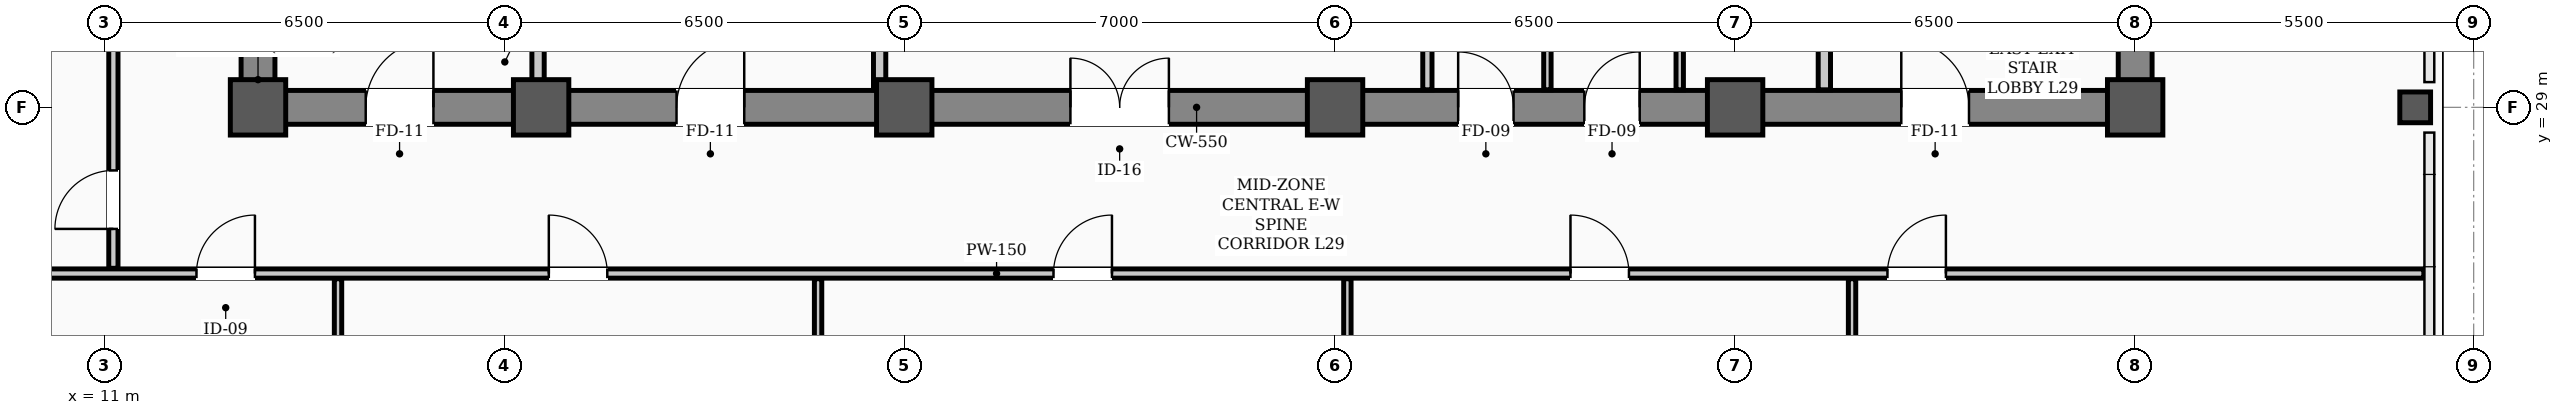
"""IFC4 building model, lengths in metres.
Left out: names, types, materials, properties, quantities, classifications, styles, units other than length and angle.
Written with IfcOpenShell. Run it as: python <this file> out.ifc"""

import sys

from ifc_helpers import new_model, si_unit, direction, frame, frame_2d, origin, origin_2d, place, context, subcontext, project, spatial, rectangle, hollow_rectangle, extrude, element, fill, save


model = new_model("IFC4")
c1 = context("Model", 3, precision=1e-05, world=origin(), true_north=direction((0.0, 1.0)))
c2 = subcontext(c1, "Body", "Model", "MODEL_VIEW")
j1 = project(units=[si_unit("LENGTHUNIT", "METRE"), si_unit("PLANEANGLEUNIT", "RADIAN")], contexts=[c1])
p1 = place(None, origin())
s1 = spatial("IfcSite", under=j1, at=p1, CompositionType="ELEMENT")
p2 = place(p1, origin())
s2 = spatial("IfcBuilding", under=s1, at=p2, CompositionType="ELEMENT")
p3 = place(p2, frame((0.0, 0.0, 118.8)))
s3 = spatial("IfcBuildingStorey", under=s2, at=p3, CompositionType="ELEMENT", Elevation=118.8)
for number, where, z_axis, x_axis in (
    (1, (13.5, 29.0, 0.0), (0.0, 0.0, 1.0), (1.0, 0.0, 0.0)),
    (2, (18.1, 29.0, 0.0), (0.0, 0.0, 1.0), (1.0, 0.0, 0.0)),
    (3, (24.0, 29.0, 0.0), (0.0, 0.0, 1.0), (1.0, 0.0, 0.0)),
    (4, (31.0, 29.0, 0.0), (0.0, 0.0, 1.0), (1.0, 0.0, 0.0)),
    (5, (37.5, 29.0, 0.0), (0.0, 0.0, 1.0), (1.0, 0.0, 0.0)),
    (6, (44.0, 29.0, 0.0), (0.0, 0.0, 1.0), (1.0, 0.0, 0.0)),
):
    element("IfcColumn", number, at=place(p3, frame(where, z_axis=z_axis, x_axis=x_axis)), inside=s3, PredefinedType="COLUMN", context=c2, shape_type="SweptSolid", body=[
        extrude(hollow_rectangle(XDim=0.9, YDim=0.9, WallThickness=0.035, InnerFilletRadius=0.017, OuterFilletRadius=0.052, at=origin_2d()), origin(), (0.0, 0.0, 1.0), 3.9),
    ])
p4 = place(p3, frame((48.55, 29.0, 0.0), z_axis=(0.0, 0.0, 1.0), x_axis=(1.0, 0.0, 0.0)))
e7 = element("IfcColumn", 7, at=p4, inside=s3, PredefinedType="COLUMN", context=c2, shape_type="SweptSolid", body=[
    extrude(hollow_rectangle(XDim=0.5, YDim=0.5, WallThickness=0.024, InnerFilletRadius=0.012, OuterFilletRadius=0.036, at=origin_2d()), origin(), (0.0, 0.0, 1.0), 3.9),
])
p5 = place(p3, frame((13.5, 29.0, 0.0), z_axis=(0.0, 0.0, 1.0), x_axis=(1.0, 0.0, 0.0)))
e8 = element("IfcWall", 8, at=p5, inside=s3, PredefinedType="SHEAR", context=c2, shape_type="SweptSolid", body=[
    extrude(rectangle(XDim=30.5, YDim=0.55, at=frame_2d((15.25, 0.0))), origin(), (0.0, 0.0, 1.0), 3.72),
])
p6 = place(p5, frame((1.75, 0.0, 0.0)))
e9 = element("IfcOpeningElement", 9, at=p6, cuts=e8, PredefinedType="OPENING", context=c2, shape_type="SweptSolid", body=[
    extrude(rectangle(XDim=1.1, YDim=2.08, at=frame_2d((0.55, 1.04))), frame((0.0, 0.285, 0.0), z_axis=(0.0, -1.0, 0.0), x_axis=(1.0, 0.0, 0.0)), (0.0, 0.0, 1.0), 0.57),
])
p7 = place(p5, frame((26.7, 0.0, 0.0)))
e10 = element("IfcOpeningElement", 10, at=p7, cuts=e8, PredefinedType="OPENING", context=c2, shape_type="SweptSolid", body=[
    extrude(rectangle(XDim=1.1, YDim=2.08, at=frame_2d((0.55, 1.04))), frame((0.0, 0.285, 0.0), z_axis=(0.0, -1.0, 0.0), x_axis=(1.0, 0.0, 0.0)), (0.0, 0.0, 1.0), 0.57),
])
p8 = place(p5, frame((6.8, 0.0, 0.0)))
e11 = element("IfcOpeningElement", 11, at=p8, cuts=e8, PredefinedType="OPENING", context=c2, shape_type="SweptSolid", body=[
    extrude(rectangle(XDim=1.1, YDim=2.08, at=frame_2d((0.55, 1.04))), frame((0.0, 0.285, 0.0), z_axis=(0.0, -1.0, 0.0), x_axis=(1.0, 0.0, 0.0)), (0.0, 0.0, 1.0), 0.57),
])
p9 = place(p5, frame((13.2, 0.0, 0.0)))
e12 = element("IfcOpeningElement", 12, at=p9, cuts=e8, PredefinedType="OPENING", context=c2, shape_type="SweptSolid", body=[
    extrude(rectangle(XDim=1.6, YDim=2.08, at=frame_2d((0.8, 1.04))), frame((0.0, 0.285, 0.0), z_axis=(0.0, -1.0, 0.0), x_axis=(1.0, 0.0, 0.0)), (0.0, 0.0, 1.0), 0.57),
])
p10 = place(p5, frame((19.5, 0.0, 0.0)))
e13 = element("IfcOpeningElement", 13, at=p10, cuts=e8, PredefinedType="OPENING", context=c2, shape_type="SweptSolid", body=[
    extrude(rectangle(XDim=0.9, YDim=2.08, at=frame_2d((0.45, 1.04))), frame((0.0, 0.285, 0.0), z_axis=(0.0, -1.0, 0.0), x_axis=(1.0, 0.0, 0.0)), (0.0, 0.0, 1.0), 0.57),
])
p11 = place(p5, frame((21.55, 0.0, 0.0)))
e14 = element("IfcOpeningElement", 14, at=p11, cuts=e8, PredefinedType="OPENING", context=c2, shape_type="SweptSolid", body=[
    extrude(rectangle(XDim=0.9, YDim=2.08, at=frame_2d((0.45, 1.04))), frame((0.0, 0.285, 0.0), z_axis=(0.0, -1.0, 0.0), x_axis=(1.0, 0.0, 0.0)), (0.0, 0.0, 1.0), 0.57),
])
for number, where, z_axis, x_axis in (
    (15, (13.5, 29.35, 0.0), (0.0, 0.0, 1.0), (0.0, 1.0, 0.0)),
    (16, (44.0, 29.35, 0.0), (0.0, 0.0, 1.0), (0.0, 1.0, 0.0)),
):
    element("IfcWall", number, at=place(p3, frame(where, z_axis=z_axis, x_axis=x_axis)), inside=s3, PredefinedType="SHEAR", context=c2, shape_type="SweptSolid", body=[
        extrude(rectangle(XDim=8.6, YDim=0.55, at=frame_2d((4.3, 0.0))), origin(), (0.0, 0.0, 1.0), 3.72),
    ])
p12 = place(p3, frame((2.31, 26.3, 0.0), z_axis=(0.0, 0.0, 1.0), x_axis=(1.0, 0.0, 0.0)))
e17 = element("IfcWall", 17, at=p12, inside=s3, PredefinedType="PARTITIONING", context=c2, shape_type="SweptSolid", body=[
    extrude(rectangle(XDim=46.38, YDim=0.15, at=frame_2d((23.19, 0.0))), origin(), (0.0, 0.0, 1.0), 3.1),
])
p13 = place(p12, frame((10.19, 0.0, 0.0)))
e18 = element("IfcOpeningElement", 18, at=p13, cuts=e17, PredefinedType="OPENING", context=c2, shape_type="SweptSolid", body=[
    extrude(rectangle(XDim=0.95, YDim=2.08, at=frame_2d((0.475, 1.04))), frame((0.0, 0.085, 0.0), z_axis=(0.0, -1.0, 0.0), x_axis=(1.0, 0.0, 0.0)), (0.0, 0.0, 1.0), 0.17),
])
p14 = place(p12, frame((15.915, 0.0, 0.0)))
e19 = element("IfcOpeningElement", 19, at=p14, cuts=e17, PredefinedType="OPENING", context=c2, shape_type="SweptSolid", body=[
    extrude(rectangle(XDim=0.95, YDim=2.08, at=frame_2d((0.475, 1.04))), frame((0.0, 0.085, 0.0), z_axis=(0.0, -1.0, 0.0), x_axis=(1.0, 0.0, 0.0)), (0.0, 0.0, 1.0), 0.17),
])
p15 = place(p12, frame((24.115, 0.0, 0.0)))
e20 = element("IfcOpeningElement", 20, at=p15, cuts=e17, PredefinedType="OPENING", context=c2, shape_type="SweptSolid", body=[
    extrude(rectangle(XDim=0.95, YDim=2.08, at=frame_2d((0.475, 1.04))), frame((0.0, 0.085, 0.0), z_axis=(0.0, -1.0, 0.0), x_axis=(1.0, 0.0, 0.0)), (0.0, 0.0, 1.0), 0.17),
])
p16 = place(p12, frame((32.515, 0.0, 0.0)))
e21 = element("IfcOpeningElement", 21, at=p16, cuts=e17, PredefinedType="OPENING", context=c2, shape_type="SweptSolid", body=[
    extrude(rectangle(XDim=0.95, YDim=2.08, at=frame_2d((0.475, 1.04))), frame((0.0, 0.085, 0.0), z_axis=(0.0, -1.0, 0.0), x_axis=(1.0, 0.0, 0.0)), (0.0, 0.0, 1.0), 0.17),
])
p17 = place(p12, frame((37.665, 0.0, 0.0)))
e22 = element("IfcOpeningElement", 22, at=p17, cuts=e17, PredefinedType="OPENING", context=c2, shape_type="SweptSolid", body=[
    extrude(rectangle(XDim=0.95, YDim=2.08, at=frame_2d((0.475, 1.04))), frame((0.0, 0.085, 0.0), z_axis=(0.0, -1.0, 0.0), x_axis=(1.0, 0.0, 0.0)), (0.0, 0.0, 1.0), 0.17),
])
for number, where, z_axis, x_axis in (
    (23, (18.05, 29.285, 0.0), (0.0, 0.0, 1.0), (0.0, 1.0, 0.0)),
    (24, (38.95, 29.285, 0.0), (0.0, 0.0, 1.0), (0.0, 1.0, 0.0)),
):
    element("IfcWall", number, at=place(p3, frame(where, z_axis=z_axis, x_axis=x_axis)), inside=s3, PredefinedType="STANDARD", context=c2, shape_type="SweptSolid", body=[
        extrude(rectangle(XDim=1.015, YDim=0.2, at=frame_2d((0.508, 0.0))), origin(), (0.0, 0.0, 1.0), 3.3),
    ])
p18 = place(p3, frame((23.6, 29.285, 0.0), z_axis=(0.0, 0.0, 1.0), x_axis=(0.0, 1.0, 0.0)))
e25 = element("IfcWall", 25, at=p18, inside=s3, PredefinedType="STANDARD", context=c2, shape_type="SweptSolid", body=[
    extrude(rectangle(XDim=5.415, YDim=0.2, at=frame_2d((2.708, 0.0))), origin(), (0.0, 0.0, 1.0), 3.1),
])
p19 = place(p3, frame((32.5, 29.285, 0.0), z_axis=(0.0, 0.0, 1.0), x_axis=(0.0, 1.0, 0.0)))
e26 = element("IfcWall", 26, at=p19, inside=s3, PredefinedType="PARTITIONING", context=c2, shape_type="SweptSolid", body=[
    extrude(rectangle(XDim=2.48, YDim=0.15, at=frame_2d((1.24, 0.0))), origin(), (0.0, 0.0, 1.0), 3.3),
])
for number, where, z_axis, x_axis in (
    (27, (36.6, 29.285, 0.0), (0.0, 0.0, 1.0), (0.0, 1.0, 0.0)),
    (28, (34.45, 29.285, 0.0), (0.0, 0.0, 1.0), (0.0, 1.0, 0.0)),
):
    element("IfcWall", number, at=place(p3, frame(where, z_axis=z_axis, x_axis=x_axis)), inside=s3, PredefinedType="PARTITIONING", context=c2, shape_type="SweptSolid", body=[
        extrude(rectangle(XDim=2.48, YDim=0.12, at=frame_2d((1.24, 0.0))), origin(), (0.0, 0.0, 1.0), 3.3),
    ])
p20 = place(p3, frame((11.15, 26.385, 0.0), z_axis=(0.0, 0.0, 1.0), x_axis=(0.0, 1.0, 0.0)))
e29 = element("IfcWall", 29, at=p20, inside=s3, PredefinedType="PARTITIONING", context=c2, shape_type="SweptSolid", body=[
    extrude(rectangle(XDim=11.28, YDim=0.15, at=frame_2d((5.64, 0.0))), origin(), (0.0, 0.0, 1.0), 3.0),
])
p21 = place(p20, frame((0.64, 0.0, 0.0)))
e30 = element("IfcOpeningElement", 30, at=p21, cuts=e29, PredefinedType="OPENING", context=c2, shape_type="SweptSolid", body=[
    extrude(rectangle(XDim=0.95, YDim=2.08, at=frame_2d((0.475, 1.04))), frame((0.0, 0.085, 0.0), z_axis=(0.0, -1.0, 0.0), x_axis=(1.0, 0.0, 0.0)), (0.0, 0.0, 1.0), 0.17),
])
p22 = place(p20, frame((8.615, 0.0, 0.0)))
e31 = element("IfcOpeningElement", 31, at=p22, cuts=e29, PredefinedType="OPENING", context=c2, shape_type="SweptSolid", body=[
    extrude(rectangle(XDim=0.95, YDim=2.08, at=frame_2d((0.475, 1.04))), frame((0.0, 0.085, 0.0), z_axis=(0.0, -1.0, 0.0), x_axis=(1.0, 0.0, 0.0)), (0.0, 0.0, 1.0), 0.17),
])
p23 = place(p3, frame((14.8, 10.81, 0.0), z_axis=(0.0, 0.0, 1.0), x_axis=(0.0, 1.0, 0.0)))
e32 = element("IfcWall", 32, at=p23, inside=s3, PredefinedType="PARTITIONING", context=c2, shape_type="SweptSolid", body=[
    extrude(rectangle(XDim=15.405, YDim=0.12, at=frame_2d((7.703, 0.0))), origin(), (0.0, 0.0, 1.0), 3.0),
])
p24 = place(p3, frame((22.6, 12.57, 0.0), z_axis=(0.0, 0.0, 1.0), x_axis=(0.0, 1.0, 0.0)))
e33 = element("IfcWall", 33, at=p24, inside=s3, PredefinedType="PARTITIONING", context=c2, shape_type="SweptSolid", body=[
    extrude(rectangle(XDim=13.645, YDim=0.12, at=frame_2d((6.823, 0.0))), origin(), (0.0, 0.0, 1.0), 3.0),
])
for number, where, z_axis, x_axis in (
    (34, (31.2, 10.81, 0.0), (0.0, 0.0, 1.0), (0.0, 1.0, 0.0)),
    (35, (39.4, 10.81, 0.0), (0.0, 0.0, 1.0), (0.0, 1.0, 0.0)),
):
    element("IfcWall", number, at=place(p3, frame(where, z_axis=z_axis, x_axis=x_axis)), inside=s3, PredefinedType="PARTITIONING", context=c2, shape_type="SweptSolid", body=[
        extrude(rectangle(XDim=15.405, YDim=0.12, at=frame_2d((7.703, 0.0))), origin(), (0.0, 0.0, 1.0), 3.0),
    ])
p25 = place(p6, origin())
e36 = element("IfcDoor", 36, at=p25, inside=s3, OperationType="SINGLE_SWING_RIGHT", PredefinedType="DOOR", context=c2, shape_type="SweptSolid", body=[
    extrude(rectangle(XDim=1.1, YDim=2.08, at=frame_2d((0.55, 1.04))), frame((0.0, 0.025, 0.0), z_axis=(0.0, -1.0, 0.0), x_axis=(1.0, 0.0, 0.0)), (0.0, 0.0, 1.0), 0.05),
])
fill(e9, e36)
p26 = place(p7, origin())
e37 = element("IfcDoor", 37, at=p26, inside=s3, OperationType="SINGLE_SWING_LEFT", PredefinedType="DOOR", context=c2, shape_type="SweptSolid", body=[
    extrude(rectangle(XDim=1.1, YDim=2.08, at=frame_2d((0.55, 1.04))), frame((0.0, 0.025, 0.0), z_axis=(0.0, -1.0, 0.0), x_axis=(1.0, 0.0, 0.0)), (0.0, 0.0, 1.0), 0.05),
])
fill(e10, e37)
p27 = place(p8, origin())
e38 = element("IfcDoor", 38, at=p27, inside=s3, OperationType="SINGLE_SWING_RIGHT", PredefinedType="DOOR", context=c2, shape_type="SweptSolid", body=[
    extrude(rectangle(XDim=1.1, YDim=2.08, at=frame_2d((0.55, 1.04))), frame((0.0, 0.025, 0.0), z_axis=(0.0, -1.0, 0.0), x_axis=(1.0, 0.0, 0.0)), (0.0, 0.0, 1.0), 0.05),
])
fill(e11, e38)
p28 = place(p9, origin())
e39 = element("IfcDoor", 39, at=p28, inside=s3, OperationType="DOUBLE_DOOR_SINGLE_SWING", PredefinedType="DOOR", context=c2, shape_type="SweptSolid", body=[
    extrude(rectangle(XDim=1.6, YDim=2.08, at=frame_2d((0.8, 1.04))), frame((0.0, 0.025, 0.0), z_axis=(0.0, -1.0, 0.0), x_axis=(1.0, 0.0, 0.0)), (0.0, 0.0, 1.0), 0.05),
])
fill(e12, e39)
p29 = place(p10, origin())
e40 = element("IfcDoor", 40, at=p29, inside=s3, OperationType="SINGLE_SWING_LEFT", PredefinedType="DOOR", context=c2, shape_type="SweptSolid", body=[
    extrude(rectangle(XDim=0.9, YDim=2.08, at=frame_2d((0.45, 1.04))), frame((0.0, 0.025, 0.0), z_axis=(0.0, -1.0, 0.0), x_axis=(1.0, 0.0, 0.0)), (0.0, 0.0, 1.0), 0.05),
])
fill(e13, e40)
p30 = place(p11, origin())
e41 = element("IfcDoor", 41, at=p30, inside=s3, OperationType="SINGLE_SWING_RIGHT", PredefinedType="DOOR", context=c2, shape_type="SweptSolid", body=[
    extrude(rectangle(XDim=0.9, YDim=2.08, at=frame_2d((0.45, 1.04))), frame((0.0, 0.025, 0.0), z_axis=(0.0, -1.0, 0.0), x_axis=(1.0, 0.0, 0.0)), (0.0, 0.0, 1.0), 0.05),
])
fill(e14, e41)
p31 = place(p13, origin())
e42 = element("IfcDoor", 42, at=p31, inside=s3, OperationType="SINGLE_SWING_RIGHT", PredefinedType="DOOR", context=c2, shape_type="SweptSolid", body=[
    extrude(rectangle(XDim=0.95, YDim=2.08, at=frame_2d((0.475, 1.04))), frame((0.0, 0.025, 0.0), z_axis=(0.0, -1.0, 0.0), x_axis=(1.0, 0.0, 0.0)), (0.0, 0.0, 1.0), 0.05),
])
fill(e18, e42)
p32 = place(p14, origin())
e43 = element("IfcDoor", 43, at=p32, inside=s3, OperationType="SINGLE_SWING_LEFT", PredefinedType="DOOR", context=c2, shape_type="SweptSolid", body=[
    extrude(rectangle(XDim=0.95, YDim=2.08, at=frame_2d((0.475, 1.04))), frame((0.0, 0.025, 0.0), z_axis=(0.0, -1.0, 0.0), x_axis=(1.0, 0.0, 0.0)), (0.0, 0.0, 1.0), 0.05),
])
fill(e19, e43)
p33 = place(p15, origin())
e44 = element("IfcDoor", 44, at=p33, inside=s3, OperationType="SINGLE_SWING_RIGHT", PredefinedType="DOOR", context=c2, shape_type="SweptSolid", body=[
    extrude(rectangle(XDim=0.95, YDim=2.08, at=frame_2d((0.475, 1.04))), frame((0.0, 0.025, 0.0), z_axis=(0.0, -1.0, 0.0), x_axis=(1.0, 0.0, 0.0)), (0.0, 0.0, 1.0), 0.05),
])
fill(e20, e44)
p34 = place(p16, origin())
e45 = element("IfcDoor", 45, at=p34, inside=s3, OperationType="SINGLE_SWING_LEFT", PredefinedType="DOOR", context=c2, shape_type="SweptSolid", body=[
    extrude(rectangle(XDim=0.95, YDim=2.08, at=frame_2d((0.475, 1.04))), frame((0.0, 0.025, 0.0), z_axis=(0.0, -1.0, 0.0), x_axis=(1.0, 0.0, 0.0)), (0.0, 0.0, 1.0), 0.05),
])
fill(e21, e45)
p35 = place(p17, origin())
e46 = element("IfcDoor", 46, at=p35, inside=s3, OperationType="SINGLE_SWING_RIGHT", PredefinedType="DOOR", context=c2, shape_type="SweptSolid", body=[
    extrude(rectangle(XDim=0.95, YDim=2.08, at=frame_2d((0.475, 1.04))), frame((0.0, 0.025, 0.0), z_axis=(0.0, -1.0, 0.0), x_axis=(1.0, 0.0, 0.0)), (0.0, 0.0, 1.0), 0.05),
])
fill(e22, e46)
p36 = place(p21, origin())
e47 = element("IfcDoor", 47, at=p36, inside=s3, OperationType="SINGLE_SWING_LEFT", PredefinedType="DOOR", context=c2, shape_type="SweptSolid", body=[
    extrude(rectangle(XDim=0.95, YDim=2.08, at=frame_2d((0.475, 1.04))), frame((0.0, 0.025, 0.0), z_axis=(0.0, -1.0, 0.0), x_axis=(1.0, 0.0, 0.0)), (0.0, 0.0, 1.0), 0.05),
])
fill(e30, e47)
save(model, sys.argv[1])
